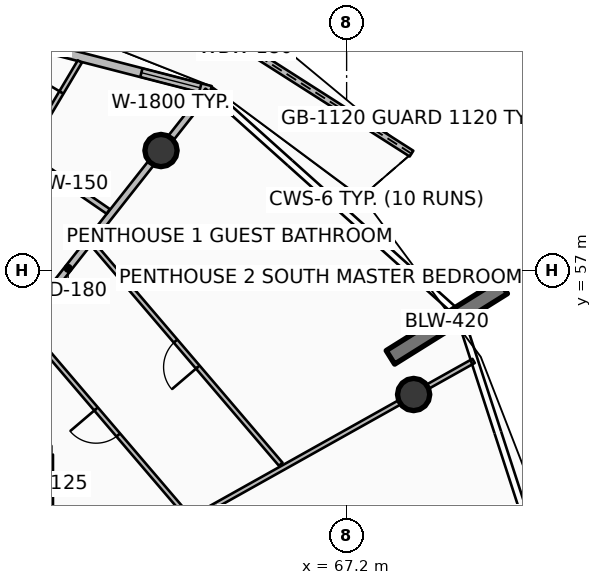
"""IFC4 building model, lengths in metres.
Left out: names, types, materials, properties, quantities, classifications, styles, units other than length and angle.
Written with IfcOpenShell. Run it as: python <this file> out.ifc"""

import sys

from ifc_helpers import new_model, si_unit, direction, frame, frame_2d, origin, origin_2d, place, context, subcontext, project, spatial, polyline, rectangle, circle, outline, extrude, element, fill, save


model = new_model("IFC4")
c1 = context("Model", 3, precision=1e-05, world=origin(), true_north=direction((0.0, 1.0)))
c2 = subcontext(c1, "Body", "Model", "MODEL_VIEW")
j1 = project(units=[si_unit("LENGTHUNIT", "METRE"), si_unit("PLANEANGLEUNIT", "RADIAN")], contexts=[c1])
p1 = place(None, origin())
s1 = spatial("IfcSite", under=j1, at=p1, CompositionType="ELEMENT")
p2 = place(p1, origin())
s2 = spatial("IfcBuilding", under=s1, at=p2, CompositionType="ELEMENT")
p3 = place(p2, frame((0.0, 0.0, 347.3)))
s3 = spatial("IfcBuildingStorey", under=s2, at=p3, CompositionType="ELEMENT", Elevation=347.3)
p4 = place(p3, frame((68.353, 54.718, 0.0), z_axis=(0.0, 0.0, 1.0), x_axis=(0.848053161125, 0.529911158502, 0.0)))
e1 = element("IfcWall", 1, at=p4, inside=s3, PredefinedType="SOLIDWALL", context=c2, shape_type="SweptSolid", body=[
    extrude(rectangle(XDim=3.5, YDim=0.42, at=frame_2d((1.75, 0.0))), origin(), (0.0, 0.0, 1.0), 4.2),
])
p5 = place(p3, frame((68.963, 53.74, 0.0), z_axis=(-0.234532013765, -0.131375056787, 0.96319018318), x_axis=(0.488708510237, -0.872447128497, 0.0)))
e2 = element("IfcColumn", 2, at=p5, inside=s3, PredefinedType="COLUMN", context=c2, shape_type="SweptSolid", body=[
    extrude(circle(Radius=0.425, at=origin_2d()), origin(), (0.0, 0.0, 1.0), 3.945),
])
p6 = place(p3, frame((62.316, 60.159, 0.0), z_axis=(-0.160640140705, -0.203700881396, 0.965764306709), x_axis=(0.785213254806, -0.619225439139, 0.0)))
e3 = element("IfcColumn", 3, at=p6, inside=s3, PredefinedType="COLUMN", context=c2, shape_type="SweptSolid", body=[
    extrude(circle(Radius=0.425, at=origin_2d()), origin(), (0.0, 0.0, 1.0), 3.935),
])
p7 = place(p3, frame((68.907, 60.078, 0.0), z_axis=(0.0, 0.0, 1.0), x_axis=(-0.842921526724, 0.538036522725, 0.0)))
e4 = element("IfcWall", 4, at=p7, inside=s3, PredefinedType="PARAPET", context=c2, shape_type="SweptSolid", body=[
    extrude(outline(polyline([(0.0, 0.0), (10.35, 0.0), (10.35, 1.632), (5.175, 1.418), (0.0, 1.233), (0.0, 0.0)])), frame((0.0, 0.09, 0.0), z_axis=(0.0, -1.0, 0.0), x_axis=(1.0, 0.0, 0.0)), (0.0, 0.0, 1.0), 0.18),
])
p8 = place(p3, frame((63.62, 61.74, 0.0), z_axis=(0.0, 0.0, 1.0), x_axis=(-0.968389076094, 0.249444577616, 0.0)))
e5 = element("IfcWall", 5, at=p8, inside=s3, PredefinedType="SOLIDWALL", context=c2, shape_type="SweptSolid", body=[
    extrude(rectangle(XDim=9.728, YDim=0.24, at=frame_2d((4.864, 0.0))), origin(), (0.0, 0.0, 1.0), 2.75),
])
p9 = place(p8, frame((7.508, 0.0, 0.0)))
e6 = element("IfcOpeningElement", 6, at=p9, cuts=e5, PredefinedType="OPENING", context=c2, shape_type="SweptSolid", body=[
    extrude(rectangle(XDim=1.45, YDim=2.15, at=frame_2d((0.725, 1.075))), frame((0.0, 0.13, 0.0), z_axis=(0.0, -1.0, 0.0), x_axis=(1.0, 0.0, 0.0)), (0.0, 0.0, 1.0), 0.26),
])
p10 = place(p8, frame((0.28, 0.0, 0.65)))
e7 = element("IfcOpeningElement", 7, at=p10, cuts=e5, PredefinedType="OPENING", context=c2, shape_type="SweptSolid", body=[
    extrude(rectangle(XDim=1.6, YDim=1.5, at=frame_2d((0.8, 0.75))), frame((0.0, 0.13, 0.0), z_axis=(0.0, -1.0, 0.0), x_axis=(1.0, 0.0, 0.0)), (0.0, 0.0, 1.0), 0.26),
])
p11 = place(p3, frame((59.41, 50.62, 0.0), z_axis=(0.0, 0.0, 1.0), x_axis=(0.0, 1.0, 0.0)))
e8 = element("IfcWall", 8, at=p11, inside=s3, PredefinedType="PARTITIONING", context=c2, shape_type="SweptSolid", body=[
    extrude(rectangle(XDim=1.54, YDim=0.125, at=frame_2d((0.77, 0.0))), origin(), (0.0, 0.0, 1.0), 3.24),
])
p12 = place(p3, frame((56.188, 52.386, 0.0), z_axis=(0.0, 0.0, 1.0), x_axis=(0.619092742501, 0.78531788225, 0.0)))
e9 = element("IfcWall", 9, at=p12, inside=s3, PredefinedType="PARTITIONING", context=c2, shape_type="SweptSolid", body=[
    extrude(rectangle(XDim=11.901, YDim=0.18, at=frame_2d((5.951, 0.0))), origin(), (0.0, 0.0, 1.0), 2.757),
])
p13 = place(p3, frame((60.927, 58.559, 0.0), z_axis=(0.0, 0.0, 1.0), x_axis=(-0.824349211277, 0.566081600007, 0.0)))
e10 = element("IfcWall", 10, at=p13, inside=s3, PredefinedType="PARTITIONING", context=c2, shape_type="SweptSolid", body=[
    extrude(rectangle(XDim=2.572, YDim=0.15, at=frame_2d((1.286, 0.0))), origin(), (0.0, 0.0, 1.0), 2.757),
])
p14 = place(p3, frame((58.778, 60.143, 0.0), z_axis=(0.0, 0.0, 1.0), x_axis=(0.510643596404, 0.85979248511, 0.0)))
e11 = element("IfcWall", 11, at=p14, inside=s3, PredefinedType="PARTITIONING", context=c2, shape_type="SweptSolid", body=[
    extrude(rectangle(XDim=2.744, YDim=0.125, at=frame_2d((1.372, 0.0))), origin(), (0.0, 0.0, 1.0), 2.775),
])
p15 = place(p14, frame((0.947, 0.0, 0.0)))
e12 = element("IfcOpeningElement", 12, at=p15, cuts=e11, PredefinedType="OPENING", context=c2, shape_type="SweptSolid", body=[
    extrude(rectangle(XDim=0.85, YDim=2.06, at=frame_2d((0.425, 1.03))), frame((0.0, 0.073, 0.0), z_axis=(0.0, -1.0, 0.0), x_axis=(1.0, 0.0, 0.0)), (0.0, 0.0, 1.0), 0.145),
])
p16 = place(p3, frame((63.178, 50.5, 0.0), z_axis=(0.0, 0.0, 1.0), x_axis=(0.872495656661, 0.488621867201, 0.0)))
e13 = element("IfcWall", 13, at=p16, inside=s3, PredefinedType="PARTITIONING", context=c2, shape_type="SweptSolid", body=[
    extrude(rectangle(XDim=8.44, YDim=0.125, at=frame_2d((4.22, 0.0))), origin(), (0.0, 0.0, 1.0), 2.757),
])
p17 = place(p3, frame((63.019, 50.535, 0.0), z_axis=(0.0, 0.0, 1.0), x_axis=(-0.649450715324, 0.760403687764, 0.0)))
e14 = element("IfcWall", 14, at=p17, inside=s3, PredefinedType="PARTITIONING", context=c2, shape_type="SweptSolid", body=[
    extrude(rectangle(XDim=6.529, YDim=0.125, at=frame_2d((3.264, 0.0))), origin(), (0.0, 0.0, 1.0), 2.757),
])
p18 = place(p17, frame((2.814, 0.0, 0.0)))
e15 = element("IfcOpeningElement", 15, at=p18, cuts=e14, PredefinedType="OPENING", context=c2, shape_type="SweptSolid", body=[
    extrude(rectangle(XDim=0.9, YDim=2.08, at=frame_2d((0.45, 1.04))), frame((0.0, 0.073, 0.0), z_axis=(0.0, -1.0, 0.0), x_axis=(1.0, 0.0, 0.0)), (0.0, 0.0, 1.0), 0.145),
])
p19 = place(p3, frame((65.467, 51.906, 0.0), z_axis=(0.0, 0.0, 1.0), x_axis=(-0.649439942486, 0.760412888571, 0.0)))
e16 = element("IfcWall", 16, at=p19, inside=s3, PredefinedType="PARTITIONING", context=c2, shape_type="SweptSolid", body=[
    extrude(rectangle(XDim=7.623, YDim=0.125, at=frame_2d((3.812, 0.0))), origin(), (0.0, 0.0, 1.0), 2.757),
])
p20 = place(p19, frame((3.362, 0.0, 0.0)))
e17 = element("IfcOpeningElement", 17, at=p20, cuts=e16, PredefinedType="OPENING", context=c2, shape_type="SweptSolid", body=[
    extrude(rectangle(XDim=0.9, YDim=2.08, at=frame_2d((0.45, 1.04))), frame((0.0, 0.073, 0.0), z_axis=(0.0, -1.0, 0.0), x_axis=(1.0, 0.0, 0.0)), (0.0, 0.0, 1.0), 0.145),
])
p21 = place(p10, origin())
e18 = element("IfcWindow", 18, at=p21, inside=s3, PartitioningType="SINGLE_PANEL", PredefinedType="WINDOW", context=c2, shape_type="SweptSolid", body=[
    extrude(rectangle(XDim=1.6, YDim=1.5, at=frame_2d((0.8, 0.75))), frame((0.0, 0.03, 0.0), z_axis=(0.0, -1.0, 0.0), x_axis=(1.0, 0.0, 0.0)), (0.0, 0.0, 1.0), 0.06),
])
fill(e7, e18)
p22 = place(p15, origin())
e19 = element("IfcDoor", 19, at=p22, inside=s3, OperationType="SINGLE_SWING_RIGHT", PredefinedType="DOOR", context=c2, shape_type="SweptSolid", body=[
    extrude(rectangle(XDim=0.85, YDim=2.06, at=frame_2d((0.425, 1.03))), frame((0.0, 0.025, 0.0), z_axis=(0.0, -1.0, 0.0), x_axis=(1.0, 0.0, 0.0)), (0.0, 0.0, 1.0), 0.05),
])
fill(e12, e19)
p23 = place(p18, origin())
e20 = element("IfcDoor", 20, at=p23, inside=s3, OperationType="SINGLE_SWING_RIGHT", PredefinedType="DOOR", context=c2, shape_type="SweptSolid", body=[
    extrude(rectangle(XDim=0.9, YDim=2.08, at=frame_2d((0.45, 1.04))), frame((0.0, 0.025, 0.0), z_axis=(0.0, -1.0, 0.0), x_axis=(1.0, 0.0, 0.0)), (0.0, 0.0, 1.0), 0.05),
])
fill(e15, e20)
p24 = place(p20, origin())
e21 = element("IfcDoor", 21, at=p24, inside=s3, OperationType="SINGLE_SWING_LEFT", PredefinedType="DOOR", context=c2, shape_type="SweptSolid", body=[
    extrude(rectangle(XDim=0.9, YDim=2.08, at=frame_2d((0.45, 1.04))), frame((0.0, 0.025, 0.0), z_axis=(0.0, -1.0, 0.0), x_axis=(1.0, 0.0, 0.0)), (0.0, 0.0, 1.0), 0.05),
])
fill(e17, e21)
save(model, sys.argv[1])
